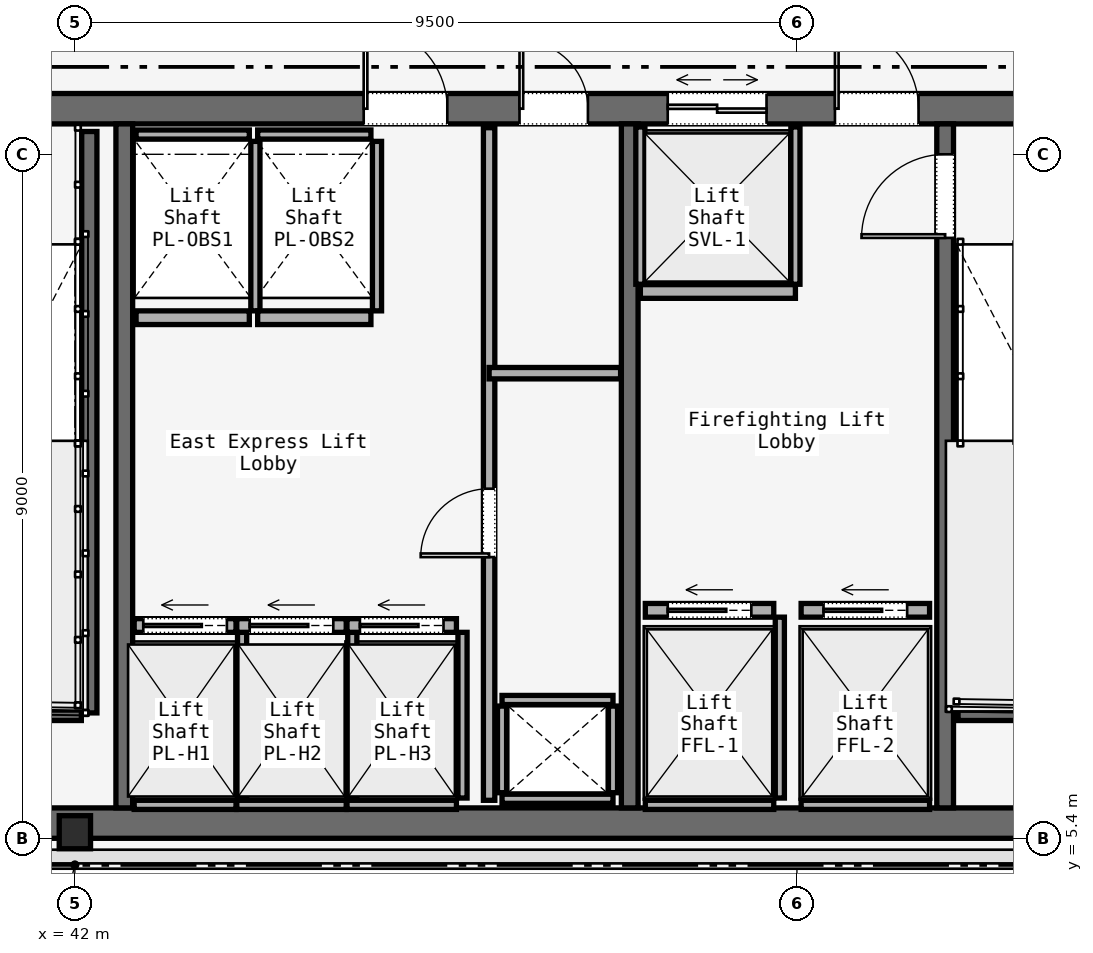
"""IFC4 building model, lengths in metres.
Left out: names, types, materials, properties, quantities, classifications, styles, units other than length and angle.
Written with IfcOpenShell. Run it as: python <this file> out.ifc"""

import sys

from ifc_helpers import new_model, si_unit, direction, frame, frame_2d, origin, origin_2d, place, context, subcontext, project, spatial, rectangle, i_section, extrude, element, fill, save


model = new_model("IFC4")
c1 = context("Model", 3, precision=1e-05, world=origin(), true_north=direction((0.0, 1.0)))
c2 = subcontext(c1, "Body", "Model", "MODEL_VIEW")
j1 = project(units=[si_unit("LENGTHUNIT", "METRE"), si_unit("PLANEANGLEUNIT", "RADIAN")], contexts=[c1])
p1 = place(None, origin())
s1 = spatial("IfcSite", under=j1, at=p1, CompositionType="ELEMENT")
p2 = place(p1, origin())
s2 = spatial("IfcBuilding", under=s1, at=p2, CompositionType="ELEMENT")
p3 = place(p2, frame((0.0, 0.0, 218.0)))
s3 = spatial("IfcBuildingStorey", under=s2, at=p3, CompositionType="ELEMENT", Elevation=218.0)
p4 = place(p3, frame((26.45, 15.0, 0.0), z_axis=(0.0, 0.0, 1.0), x_axis=(1.0, 0.0, 0.0)))
e1 = element("IfcWall", 1, at=p4, inside=s3, PredefinedType="SOLIDWALL", context=c2, shape_type="SweptSolid", body=[
    extrude(rectangle(XDim=31.1, YDim=0.4, at=frame_2d((15.55, 0.0))), origin(), (0.0, 0.0, 1.0), 3.58),
])
p5 = place(p4, frame((1.65, 0.0, 0.0)))
e2 = element("IfcOpeningElement", 2, at=p5, cuts=e1, PredefinedType="OPENING", context=c2, shape_type="SweptSolid", body=[
    extrude(rectangle(XDim=1.1, YDim=2.2, at=frame_2d((0.55, 1.1))), frame((0.0, 0.2, 0.0), z_axis=(0.0, -1.0, 0.0), x_axis=(1.0, 0.0, 0.0)), (0.0, 0.0, 1.0), 0.4),
])
p6 = place(p4, frame((13.65, 0.0, 0.0)))
e3 = element("IfcOpeningElement", 3, at=p6, cuts=e1, PredefinedType="OPENING", context=c2, shape_type="SweptSolid", body=[
    extrude(rectangle(XDim=1.1, YDim=2.2, at=frame_2d((0.55, 1.1))), frame((0.0, 0.2, 0.0), z_axis=(0.0, -1.0, 0.0), x_axis=(1.0, 0.0, 0.0)), (0.0, 0.0, 1.0), 0.4),
])
p7 = place(p4, frame((25.55, 0.0, 0.0)))
e4 = element("IfcOpeningElement", 4, at=p7, cuts=e1, PredefinedType="OPENING", context=c2, shape_type="SweptSolid", body=[
    extrude(rectangle(XDim=1.1, YDim=2.2, at=frame_2d((0.55, 1.1))), frame((0.0, 0.2, 0.0), z_axis=(0.0, -1.0, 0.0), x_axis=(1.0, 0.0, 0.0)), (0.0, 0.0, 1.0), 0.4),
])
p8 = place(p4, frame((19.35, 0.0, 0.0)))
e5 = element("IfcOpeningElement", 5, at=p8, cuts=e1, PredefinedType="OPENING", context=c2, shape_type="SweptSolid", body=[
    extrude(rectangle(XDim=1.1, YDim=2.2, at=frame_2d((0.55, 1.1))), frame((0.0, 0.2, 0.0), z_axis=(0.0, -1.0, 0.0), x_axis=(1.0, 0.0, 0.0)), (0.0, 0.0, 1.0), 0.4),
])
p9 = place(p4, frame((21.4, 0.0, 0.0)))
e6 = element("IfcOpeningElement", 6, at=p9, cuts=e1, PredefinedType="OPENING", context=c2, shape_type="SweptSolid", body=[
    extrude(rectangle(XDim=0.9, YDim=2.1, at=frame_2d((0.45, 1.05))), frame((0.0, 0.2, 0.0), z_axis=(0.0, -1.0, 0.0), x_axis=(1.0, 0.0, 0.0)), (0.0, 0.0, 1.0), 0.4),
])
p10 = place(p4, frame((5.14, 0.0, 0.0)))
e7 = element("IfcOpeningElement", 7, at=p10, cuts=e1, PredefinedType="OPENING", context=c2, shape_type="SweptSolid", body=[
    extrude(rectangle(XDim=0.95, YDim=2.2, at=frame_2d((0.475, 1.1))), frame((0.0, 0.2, 0.0), z_axis=(0.0, -1.0, 0.0), x_axis=(1.0, 0.0, 0.0)), (0.0, 0.0, 1.0), 0.4),
])
p11 = place(p4, frame((7.825, 0.0, 0.0)))
e8 = element("IfcOpeningElement", 8, at=p11, cuts=e1, PredefinedType="OPENING", context=c2, shape_type="SweptSolid", body=[
    extrude(rectangle(XDim=0.95, YDim=2.2, at=frame_2d((0.475, 1.1))), frame((0.0, 0.2, 0.0), z_axis=(0.0, -1.0, 0.0), x_axis=(1.0, 0.0, 0.0)), (0.0, 0.0, 1.0), 0.4),
])
p12 = place(p4, frame((10.46, 0.0, 0.0)))
e9 = element("IfcOpeningElement", 9, at=p12, cuts=e1, PredefinedType="OPENING", context=c2, shape_type="SweptSolid", body=[
    extrude(rectangle(XDim=0.95, YDim=2.2, at=frame_2d((0.475, 1.1))), frame((0.0, 0.2, 0.0), z_axis=(0.0, -1.0, 0.0), x_axis=(1.0, 0.0, 0.0)), (0.0, 0.0, 1.0), 0.4),
])
p13 = place(p4, frame((23.35, 0.0, 0.0)))
e10 = element("IfcOpeningElement", 10, at=p13, cuts=e1, PredefinedType="OPENING", context=c2, shape_type="SweptSolid", body=[
    extrude(rectangle(XDim=1.3, YDim=2.3, at=frame_2d((0.65, 1.15))), frame((0.0, 0.2, 0.0), z_axis=(0.0, -1.0, 0.0), x_axis=(1.0, 0.0, 0.0)), (0.0, 0.0, 1.0), 0.4),
])
p14 = place(p3, frame((26.45, 5.6, 0.0), z_axis=(0.0, 0.0, 1.0), x_axis=(1.0, 0.0, 0.0)))
e11 = element("IfcWall", 11, at=p14, inside=s3, PredefinedType="SOLIDWALL", context=c2, shape_type="SweptSolid", body=[
    extrude(rectangle(XDim=31.1, YDim=0.4, at=frame_2d((15.55, 0.0))), origin(), (0.0, 0.0, 1.0), 3.58),
])
for number, where, z_axis, x_axis in (
    (12, (42.65, 5.8, 0.0), (0.0, 0.0, 1.0), (0.0, 1.0, 0.0)),
    (13, (49.3, 5.8, 0.0), (0.0, 0.0, 1.0), (0.0, 1.0, 0.0)),
):
    element("IfcWall", number, at=place(p3, frame(where, z_axis=z_axis, x_axis=x_axis)), inside=s3, PredefinedType="SOLIDWALL", context=c2, shape_type="SweptSolid", body=[
        extrude(rectangle(XDim=9.0, YDim=0.22, at=frame_2d((4.5, 0.0))), origin(), (0.0, 0.0, 1.0), 3.58),
    ])
p15 = place(p3, frame((53.45, 5.8, 0.0), z_axis=(0.0, 0.0, 1.0), x_axis=(0.0, 1.0, 0.0)))
e14 = element("IfcWall", 14, at=p15, inside=s3, PredefinedType="SOLIDWALL", context=c2, shape_type="SweptSolid", body=[
    extrude(rectangle(XDim=9.0, YDim=0.22, at=frame_2d((4.5, 0.0))), origin(), (0.0, 0.0, 1.0), 3.58),
])
p16 = place(p15, frame((7.5, 0.0, 0.0)))
e15 = element("IfcOpeningElement", 15, at=p16, cuts=e14, PredefinedType="OPENING", context=c2, shape_type="SweptSolid", body=[
    extrude(rectangle(XDim=1.1, YDim=2.2, at=frame_2d((0.55, 1.1))), frame((0.0, 0.11, 0.0), z_axis=(0.0, -1.0, 0.0), x_axis=(1.0, 0.0, 0.0)), (0.0, 0.0, 1.0), 0.22),
])
p17 = place(p3, frame((42.0, 5.48, 0.0), z_axis=(0.0, 0.0, 1.0), x_axis=(1.0, 0.0, 0.0)))
e16 = element("IfcColumn", 16, at=p17, inside=s3, PredefinedType="COLUMN", context=c2, shape_type="SweptSolid", body=[
    extrude(i_section(OverallWidth=0.412, OverallDepth=0.435, WebThickness=0.036, FlangeThickness=0.044, FilletRadius=0.015, at=origin_2d()), origin(), (0.0, 0.0, 1.0), 3.58),
])
p18 = place(p3, frame((42.19, 14.7, 0.0), z_axis=(0.0, 0.0, 1.0), x_axis=(0.0, -1.0, 0.0)))
e17 = element("IfcWall", 17, at=p18, inside=s3, PredefinedType="SOLIDWALL", context=c2, shape_type="SweptSolid", body=[
    extrude(rectangle(XDim=7.65, YDim=0.2, at=frame_2d((3.825, 0.0))), origin(), (0.0, 0.0, 1.0), 3.8),
])
for number, where, z_axis, x_axis in (
    (18, (38.97, 7.05, 0.0), (0.0, 0.0, 1.0), (1.0, 0.0, 0.0)),
    (19, (53.62, 7.05, 0.0), (0.0, 0.0, 1.0), (1.0, 0.0, 0.0)),
):
    element("IfcWall", number, at=place(p3, frame(where, z_axis=z_axis, x_axis=x_axis)), inside=s3, PredefinedType="SOLIDWALL", context=c2, shape_type="SweptSolid", body=[
        extrude(rectangle(XDim=3.115, YDim=0.2, at=frame_2d((1.558, 0.0))), origin(), (0.0, 0.0, 1.0), 3.8),
    ])
for number, where, z_axis, x_axis in (
    (20, (47.62, 5.92, 0.0), (0.0, 0.0, 1.0), (1.0, 0.0, 0.0)),
    (21, (47.62, 7.22, 0.0), (0.0, 0.0, 1.0), (1.0, 0.0, 0.0)),
):
    element("IfcWall", number, at=place(p3, frame(where, z_axis=z_axis, x_axis=x_axis)), inside=s3, PredefinedType="SOLIDWALL", context=c2, shape_type="SweptSolid", body=[
        extrude(rectangle(XDim=1.46, YDim=0.12, at=frame_2d((0.73, 0.0))), origin(), (0.0, 0.0, 1.0), 3.01),
    ])
for number, where, z_axis, x_axis in (
    (22, (47.62, 6.0, 0.0), (0.0, 0.0, 1.0), (0.0, 1.0, 0.0)),
    (23, (49.08, 6.0, 0.0), (0.0, 0.0, 1.0), (0.0, 1.0, 0.0)),
):
    element("IfcWall", number, at=place(p3, frame(where, z_axis=z_axis, x_axis=x_axis)), inside=s3, PredefinedType="SOLIDWALL", context=c2, shape_type="SweptSolid", body=[
        extrude(rectangle(XDim=1.14, YDim=0.12, at=frame_2d((0.57, 0.0))), origin(), (0.0, 0.0, 1.0), 3.01),
    ])
p19 = place(p3, frame((47.45, 5.9, 0.0), z_axis=(0.0, 0.0, 1.0), x_axis=(0.0, 1.0, 0.0)))
e24 = element("IfcWall", 24, at=p19, inside=s3, PredefinedType="PARTITIONING", context=c2, shape_type="SweptSolid", body=[
    extrude(rectangle(XDim=8.85, YDim=0.15, at=frame_2d((4.425, 0.0))), origin(), (0.0, 0.0, 1.0), 3.01),
])
p20 = place(p19, frame((3.2, 0.0, 0.0)))
e25 = element("IfcOpeningElement", 25, at=p20, cuts=e24, PredefinedType="OPENING", context=c2, shape_type="SweptSolid", body=[
    extrude(rectangle(XDim=0.9, YDim=2.1, at=frame_2d((0.45, 1.05))), frame((0.0, 0.075, 0.0), z_axis=(0.0, -1.0, 0.0), x_axis=(1.0, 0.0, 0.0)), (0.0, 0.0, 1.0), 0.15),
])
p21 = place(p3, frame((47.45, 11.52, 0.0), z_axis=(0.0, 0.0, 1.0), x_axis=(1.0, 0.0, 0.0)))
e26 = element("IfcWall", 26, at=p21, inside=s3, PredefinedType="PARTITIONING", context=c2, shape_type="SweptSolid", body=[
    extrude(rectangle(XDim=1.73, YDim=0.15, at=frame_2d((0.865, 0.0))), origin(), (0.0, 0.0, 1.0), 3.01),
])
p22 = place(p3, frame((42.78, 8.2, 0.0), z_axis=(0.0, 0.0, 1.0), x_axis=(1.0, 0.0, 0.0)))
e27 = element("IfcWall", 27, at=p22, inside=s3, PredefinedType="SOLIDWALL", context=c2, shape_type="SweptSolid", body=[
    extrude(rectangle(XDim=1.34, YDim=0.18, at=frame_2d((0.67, 0.0))), origin(), (0.0, 0.0, 1.0), 3.01),
])
p23 = place(p22, frame((0.12, 0.0, 0.0)))
e28 = element("IfcOpeningElement", 28, at=p23, cuts=e27, PredefinedType="OPENING", context=c2, shape_type="SweptSolid", body=[
    extrude(rectangle(XDim=1.1, YDim=2.2, at=frame_2d((0.55, 1.1))), frame((0.0, 0.09, 0.0), z_axis=(0.0, -1.0, 0.0), x_axis=(1.0, 0.0, 0.0)), (0.0, 0.0, 1.0), 0.18),
])
p24 = place(p3, frame((42.78, 5.84, 0.0), z_axis=(0.0, 0.0, 1.0), x_axis=(1.0, 0.0, 0.0)))
e29 = element("IfcWall", 29, at=p24, inside=s3, PredefinedType="SOLIDWALL", context=c2, shape_type="SweptSolid", body=[
    extrude(rectangle(XDim=1.34, YDim=0.12, at=frame_2d((0.67, 0.0))), origin(), (0.0, 0.0, 1.0), 3.01),
])
p25 = place(p3, frame((44.2, 5.93, 0.0), z_axis=(0.0, 0.0, 1.0), x_axis=(0.0, 1.0, 0.0)))
e30 = element("IfcWall", 30, at=p25, inside=s3, PredefinedType="SOLIDWALL", context=c2, shape_type="SweptSolid", body=[
    extrude(rectangle(XDim=2.18, YDim=0.12, at=frame_2d((1.09, 0.0))), origin(), (0.0, 0.0, 1.0), 3.01),
])
p26 = place(p3, frame((44.13, 8.2, 0.0), z_axis=(0.0, 0.0, 1.0), x_axis=(1.0, 0.0, 0.0)))
e31 = element("IfcWall", 31, at=p26, inside=s3, PredefinedType="SOLIDWALL", context=c2, shape_type="SweptSolid", body=[
    extrude(rectangle(XDim=1.44, YDim=0.18, at=frame_2d((0.72, 0.0))), origin(), (0.0, 0.0, 1.0), 3.01),
])
p27 = place(p26, frame((0.17, 0.0, 0.0)))
e32 = element("IfcOpeningElement", 32, at=p27, cuts=e31, PredefinedType="OPENING", context=c2, shape_type="SweptSolid", body=[
    extrude(rectangle(XDim=1.1, YDim=2.2, at=frame_2d((0.55, 1.1))), frame((0.0, 0.09, 0.0), z_axis=(0.0, -1.0, 0.0), x_axis=(1.0, 0.0, 0.0)), (0.0, 0.0, 1.0), 0.18),
])
p28 = place(p3, frame((44.13, 5.84, 0.0), z_axis=(0.0, 0.0, 1.0), x_axis=(1.0, 0.0, 0.0)))
e33 = element("IfcWall", 33, at=p28, inside=s3, PredefinedType="SOLIDWALL", context=c2, shape_type="SweptSolid", body=[
    extrude(rectangle(XDim=1.44, YDim=0.12, at=frame_2d((0.72, 0.0))), origin(), (0.0, 0.0, 1.0), 3.01),
])
p29 = place(p3, frame((45.65, 5.93, 0.0), z_axis=(0.0, 0.0, 1.0), x_axis=(0.0, 1.0, 0.0)))
e34 = element("IfcWall", 34, at=p29, inside=s3, PredefinedType="SOLIDWALL", context=c2, shape_type="SweptSolid", body=[
    extrude(rectangle(XDim=2.18, YDim=0.12, at=frame_2d((1.09, 0.0))), origin(), (0.0, 0.0, 1.0), 3.01),
])
p30 = place(p3, frame((45.58, 8.2, 0.0), z_axis=(0.0, 0.0, 1.0), x_axis=(1.0, 0.0, 0.0)))
e35 = element("IfcWall", 35, at=p30, inside=s3, PredefinedType="SOLIDWALL", context=c2, shape_type="SweptSolid", body=[
    extrude(rectangle(XDim=1.44, YDim=0.18, at=frame_2d((0.72, 0.0))), origin(), (0.0, 0.0, 1.0), 3.01),
])
p31 = place(p30, frame((0.17, 0.0, 0.0)))
e36 = element("IfcOpeningElement", 36, at=p31, cuts=e35, PredefinedType="OPENING", context=c2, shape_type="SweptSolid", body=[
    extrude(rectangle(XDim=1.1, YDim=2.2, at=frame_2d((0.55, 1.1))), frame((0.0, 0.09, 0.0), z_axis=(0.0, -1.0, 0.0), x_axis=(1.0, 0.0, 0.0)), (0.0, 0.0, 1.0), 0.18),
])
p32 = place(p3, frame((45.58, 5.84, 0.0), z_axis=(0.0, 0.0, 1.0), x_axis=(1.0, 0.0, 0.0)))
e37 = element("IfcWall", 37, at=p32, inside=s3, PredefinedType="SOLIDWALL", context=c2, shape_type="SweptSolid", body=[
    extrude(rectangle(XDim=1.44, YDim=0.12, at=frame_2d((0.72, 0.0))), origin(), (0.0, 0.0, 1.0), 3.01),
])
p33 = place(p3, frame((47.1, 5.93, 0.0), z_axis=(0.0, 0.0, 1.0), x_axis=(0.0, 1.0, 0.0)))
e38 = element("IfcWall", 38, at=p33, inside=s3, PredefinedType="SOLIDWALL", context=c2, shape_type="SweptSolid", body=[
    extrude(rectangle(XDim=2.18, YDim=0.12, at=frame_2d((1.09, 0.0))), origin(), (0.0, 0.0, 1.0), 3.01),
])
p34 = place(p3, frame((42.805, 12.25, 0.0), z_axis=(0.0, 0.0, 1.0), x_axis=(1.0, 0.0, 0.0)))
e39 = element("IfcWall", 39, at=p34, inside=s3, PredefinedType="SOLIDWALL", context=c2, shape_type="SweptSolid", body=[
    extrude(rectangle(XDim=1.49, YDim=0.18, at=frame_2d((0.745, 0.0))), origin(), (0.0, 0.0, 1.0), 3.01),
])
p35 = place(p3, frame((42.805, 14.66, 0.0), z_axis=(0.0, 0.0, 1.0), x_axis=(1.0, 0.0, 0.0)))
e40 = element("IfcWall", 40, at=p35, inside=s3, PredefinedType="SOLIDWALL", context=c2, shape_type="SweptSolid", body=[
    extrude(rectangle(XDim=1.49, YDim=0.12, at=frame_2d((0.745, 0.0))), origin(), (0.0, 0.0, 1.0), 3.01),
])
p36 = place(p3, frame((44.375, 12.34, 0.0), z_axis=(0.0, 0.0, 1.0), x_axis=(0.0, 1.0, 0.0)))
e41 = element("IfcWall", 41, at=p36, inside=s3, PredefinedType="SOLIDWALL", context=c2, shape_type="SweptSolid", body=[
    extrude(rectangle(XDim=2.23, YDim=0.12, at=frame_2d((1.115, 0.0))), origin(), (0.0, 0.0, 1.0), 3.01),
])
p37 = place(p3, frame((44.405, 12.25, 0.0), z_axis=(0.0, 0.0, 1.0), x_axis=(1.0, 0.0, 0.0)))
e42 = element("IfcWall", 42, at=p37, inside=s3, PredefinedType="SOLIDWALL", context=c2, shape_type="SweptSolid", body=[
    extrude(rectangle(XDim=1.49, YDim=0.18, at=frame_2d((0.745, 0.0))), origin(), (0.0, 0.0, 1.0), 3.01),
])
p38 = place(p3, frame((44.405, 14.66, 0.0), z_axis=(0.0, 0.0, 1.0), x_axis=(1.0, 0.0, 0.0)))
e43 = element("IfcWall", 43, at=p38, inside=s3, PredefinedType="SOLIDWALL", context=c2, shape_type="SweptSolid", body=[
    extrude(rectangle(XDim=1.49, YDim=0.12, at=frame_2d((0.745, 0.0))), origin(), (0.0, 0.0, 1.0), 3.01),
])
p39 = place(p3, frame((45.975, 12.34, 0.0), z_axis=(0.0, 0.0, 1.0), x_axis=(0.0, 1.0, 0.0)))
e44 = element("IfcWall", 44, at=p39, inside=s3, PredefinedType="SOLIDWALL", context=c2, shape_type="SweptSolid", body=[
    extrude(rectangle(XDim=2.23, YDim=0.12, at=frame_2d((1.115, 0.0))), origin(), (0.0, 0.0, 1.0), 3.01),
])
p40 = place(p3, frame((49.505, 8.4, 0.0), z_axis=(0.0, 0.0, 1.0), x_axis=(1.0, 0.0, 0.0)))
e45 = element("IfcWall", 45, at=p40, inside=s3, PredefinedType="SOLIDWALL", context=c2, shape_type="SweptSolid", body=[
    extrude(rectangle(XDim=1.69, YDim=0.18, at=frame_2d((0.845, 0.0))), origin(), (0.0, 0.0, 1.0), 3.01),
])
p41 = place(p40, frame((0.295, 0.0, 0.0)))
e46 = element("IfcOpeningElement", 46, at=p41, cuts=e45, PredefinedType="OPENING", context=c2, shape_type="SweptSolid", body=[
    extrude(rectangle(XDim=1.1, YDim=2.2, at=frame_2d((0.55, 1.1))), frame((0.0, 0.09, 0.0), z_axis=(0.0, -1.0, 0.0), x_axis=(1.0, 0.0, 0.0)), (0.0, 0.0, 1.0), 0.18),
])
p42 = place(p3, frame((49.505, 5.84, 0.0), z_axis=(0.0, 0.0, 1.0), x_axis=(1.0, 0.0, 0.0)))
e47 = element("IfcWall", 47, at=p42, inside=s3, PredefinedType="SOLIDWALL", context=c2, shape_type="SweptSolid", body=[
    extrude(rectangle(XDim=1.69, YDim=0.12, at=frame_2d((0.845, 0.0))), origin(), (0.0, 0.0, 1.0), 3.01),
])
p43 = place(p3, frame((51.275, 5.93, 0.0), z_axis=(0.0, 0.0, 1.0), x_axis=(0.0, 1.0, 0.0)))
e48 = element("IfcWall", 48, at=p43, inside=s3, PredefinedType="SOLIDWALL", context=c2, shape_type="SweptSolid", body=[
    extrude(rectangle(XDim=2.38, YDim=0.12, at=frame_2d((1.19, 0.0))), origin(), (0.0, 0.0, 1.0), 3.01),
])
p44 = place(p3, frame((51.555, 8.4, 0.0), z_axis=(0.0, 0.0, 1.0), x_axis=(1.0, 0.0, 0.0)))
e49 = element("IfcWall", 49, at=p44, inside=s3, PredefinedType="SOLIDWALL", context=c2, shape_type="SweptSolid", body=[
    extrude(rectangle(XDim=1.69, YDim=0.18, at=frame_2d((0.845, 0.0))), origin(), (0.0, 0.0, 1.0), 3.01),
])
p45 = place(p44, frame((0.295, 0.0, 0.0)))
e50 = element("IfcOpeningElement", 50, at=p45, cuts=e49, PredefinedType="OPENING", context=c2, shape_type="SweptSolid", body=[
    extrude(rectangle(XDim=1.1, YDim=2.2, at=frame_2d((0.55, 1.1))), frame((0.0, 0.09, 0.0), z_axis=(0.0, -1.0, 0.0), x_axis=(1.0, 0.0, 0.0)), (0.0, 0.0, 1.0), 0.18),
])
p46 = place(p3, frame((51.555, 5.84, 0.0), z_axis=(0.0, 0.0, 1.0), x_axis=(1.0, 0.0, 0.0)))
e51 = element("IfcWall", 51, at=p46, inside=s3, PredefinedType="SOLIDWALL", context=c2, shape_type="SweptSolid", body=[
    extrude(rectangle(XDim=1.69, YDim=0.12, at=frame_2d((0.845, 0.0))), origin(), (0.0, 0.0, 1.0), 3.01),
])
p47 = place(p3, frame((49.44, 12.595, 0.0), z_axis=(0.0, 0.0, 1.0), x_axis=(1.0, 0.0, 0.0)))
e52 = element("IfcWall", 52, at=p47, inside=s3, PredefinedType="SOLIDWALL", context=c2, shape_type="SweptSolid", body=[
    extrude(rectangle(XDim=2.04, YDim=0.18, at=frame_2d((1.02, 0.0))), origin(), (0.0, 0.0, 1.0), 3.01),
])
for number, where, z_axis, x_axis in (
    (53, (49.44, 12.69, 0.0), (0.0, 0.0, 1.0), (0.0, 1.0, 0.0)),
    (54, (51.48, 12.69, 0.0), (0.0, 0.0, 1.0), (0.0, 1.0, 0.0)),
):
    element("IfcWall", number, at=place(p3, frame(where, z_axis=z_axis, x_axis=x_axis)), inside=s3, PredefinedType="SOLIDWALL", context=c2, shape_type="SweptSolid", body=[
        extrude(rectangle(XDim=2.07, YDim=0.12, at=frame_2d((1.035, 0.0))), origin(), (0.0, 0.0, 1.0), 3.01),
    ])
p48 = place(p7, origin())
e55 = element("IfcDoor", 55, at=p48, inside=s3, OperationType="SINGLE_SWING_RIGHT", PredefinedType="DOOR", context=c2, shape_type="SweptSolid", body=[
    extrude(rectangle(XDim=1.1, YDim=2.2, at=frame_2d((0.55, 1.1))), frame((0.0, 0.025, 0.0), z_axis=(0.0, -1.0, 0.0), x_axis=(1.0, 0.0, 0.0)), (0.0, 0.0, 1.0), 0.05),
])
fill(e4, e55)
p49 = place(p8, origin())
e56 = element("IfcDoor", 56, at=p49, inside=s3, OperationType="SINGLE_SWING_LEFT", PredefinedType="DOOR", context=c2, shape_type="SweptSolid", body=[
    extrude(rectangle(XDim=1.1, YDim=2.2, at=frame_2d((0.55, 1.1))), frame((0.0, 0.025, 0.0), z_axis=(0.0, -1.0, 0.0), x_axis=(1.0, 0.0, 0.0)), (0.0, 0.0, 1.0), 0.05),
])
fill(e5, e56)
p50 = place(p9, origin())
e57 = element("IfcDoor", 57, at=p50, inside=s3, OperationType="SINGLE_SWING_LEFT", PredefinedType="DOOR", context=c2, shape_type="SweptSolid", body=[
    extrude(rectangle(XDim=0.9, YDim=2.1, at=frame_2d((0.45, 1.05))), frame((0.0, 0.025, 0.0), z_axis=(0.0, -1.0, 0.0), x_axis=(1.0, 0.0, 0.0)), (0.0, 0.0, 1.0), 0.05),
])
fill(e6, e57)
p51 = place(p16, origin())
e58 = element("IfcDoor", 58, at=p51, inside=s3, OperationType="SINGLE_SWING_LEFT", PredefinedType="DOOR", context=c2, shape_type="SweptSolid", body=[
    extrude(rectangle(XDim=1.1, YDim=2.2, at=frame_2d((0.55, 1.1))), frame((0.0, 0.025, 0.0), z_axis=(0.0, -1.0, 0.0), x_axis=(1.0, 0.0, 0.0)), (0.0, 0.0, 1.0), 0.05),
])
fill(e15, e58)
p52 = place(p20, origin())
e59 = element("IfcDoor", 59, at=p52, inside=s3, OperationType="SINGLE_SWING_LEFT", PredefinedType="DOOR", context=c2, shape_type="SweptSolid", body=[
    extrude(rectangle(XDim=0.9, YDim=2.1, at=frame_2d((0.45, 1.05))), frame((0.0, 0.025, 0.0), z_axis=(0.0, -1.0, 0.0), x_axis=(1.0, 0.0, 0.0)), (0.0, 0.0, 1.0), 0.05),
])
fill(e25, e59)
p53 = place(p23, origin())
e60 = element("IfcDoor", 60, at=p53, inside=s3, OperationType="SLIDING_TO_LEFT", PredefinedType="DOOR", context=c2, shape_type="SweptSolid", body=[
    extrude(rectangle(XDim=1.1, YDim=2.2, at=frame_2d((0.55, 1.1))), frame((0.0, 0.025, 0.0), z_axis=(0.0, -1.0, 0.0), x_axis=(1.0, 0.0, 0.0)), (0.0, 0.0, 1.0), 0.05),
])
fill(e28, e60)
p54 = place(p27, origin())
e61 = element("IfcDoor", 61, at=p54, inside=s3, OperationType="SLIDING_TO_LEFT", PredefinedType="DOOR", context=c2, shape_type="SweptSolid", body=[
    extrude(rectangle(XDim=1.1, YDim=2.2, at=frame_2d((0.55, 1.1))), frame((0.0, 0.025, 0.0), z_axis=(0.0, -1.0, 0.0), x_axis=(1.0, 0.0, 0.0)), (0.0, 0.0, 1.0), 0.05),
])
fill(e32, e61)
p55 = place(p31, origin())
e62 = element("IfcDoor", 62, at=p55, inside=s3, OperationType="SLIDING_TO_LEFT", PredefinedType="DOOR", context=c2, shape_type="SweptSolid", body=[
    extrude(rectangle(XDim=1.1, YDim=2.2, at=frame_2d((0.55, 1.1))), frame((0.0, 0.025, 0.0), z_axis=(0.0, -1.0, 0.0), x_axis=(1.0, 0.0, 0.0)), (0.0, 0.0, 1.0), 0.05),
])
fill(e36, e62)
p56 = place(p41, origin())
e63 = element("IfcDoor", 63, at=p56, inside=s3, OperationType="SLIDING_TO_LEFT", PredefinedType="DOOR", context=c2, shape_type="SweptSolid", body=[
    extrude(rectangle(XDim=1.1, YDim=2.2, at=frame_2d((0.55, 1.1))), frame((0.0, 0.025, 0.0), z_axis=(0.0, -1.0, 0.0), x_axis=(1.0, 0.0, 0.0)), (0.0, 0.0, 1.0), 0.05),
])
fill(e46, e63)
p57 = place(p45, origin())
e64 = element("IfcDoor", 64, at=p57, inside=s3, OperationType="SLIDING_TO_LEFT", PredefinedType="DOOR", context=c2, shape_type="SweptSolid", body=[
    extrude(rectangle(XDim=1.1, YDim=2.2, at=frame_2d((0.55, 1.1))), frame((0.0, 0.025, 0.0), z_axis=(0.0, -1.0, 0.0), x_axis=(1.0, 0.0, 0.0)), (0.0, 0.0, 1.0), 0.05),
])
fill(e50, e64)
p58 = place(p13, origin())
e65 = element("IfcDoor", 65, at=p58, inside=s3, OperationType="DOUBLE_DOOR_SLIDING", PredefinedType="DOOR", context=c2, shape_type="SweptSolid", body=[
    extrude(rectangle(XDim=1.3, YDim=2.3, at=frame_2d((0.65, 1.15))), frame((0.0, 0.025, 0.0), z_axis=(0.0, -1.0, 0.0), x_axis=(1.0, 0.0, 0.0)), (0.0, 0.0, 1.0), 0.05),
])
fill(e10, e65)
save(model, sys.argv[1])
